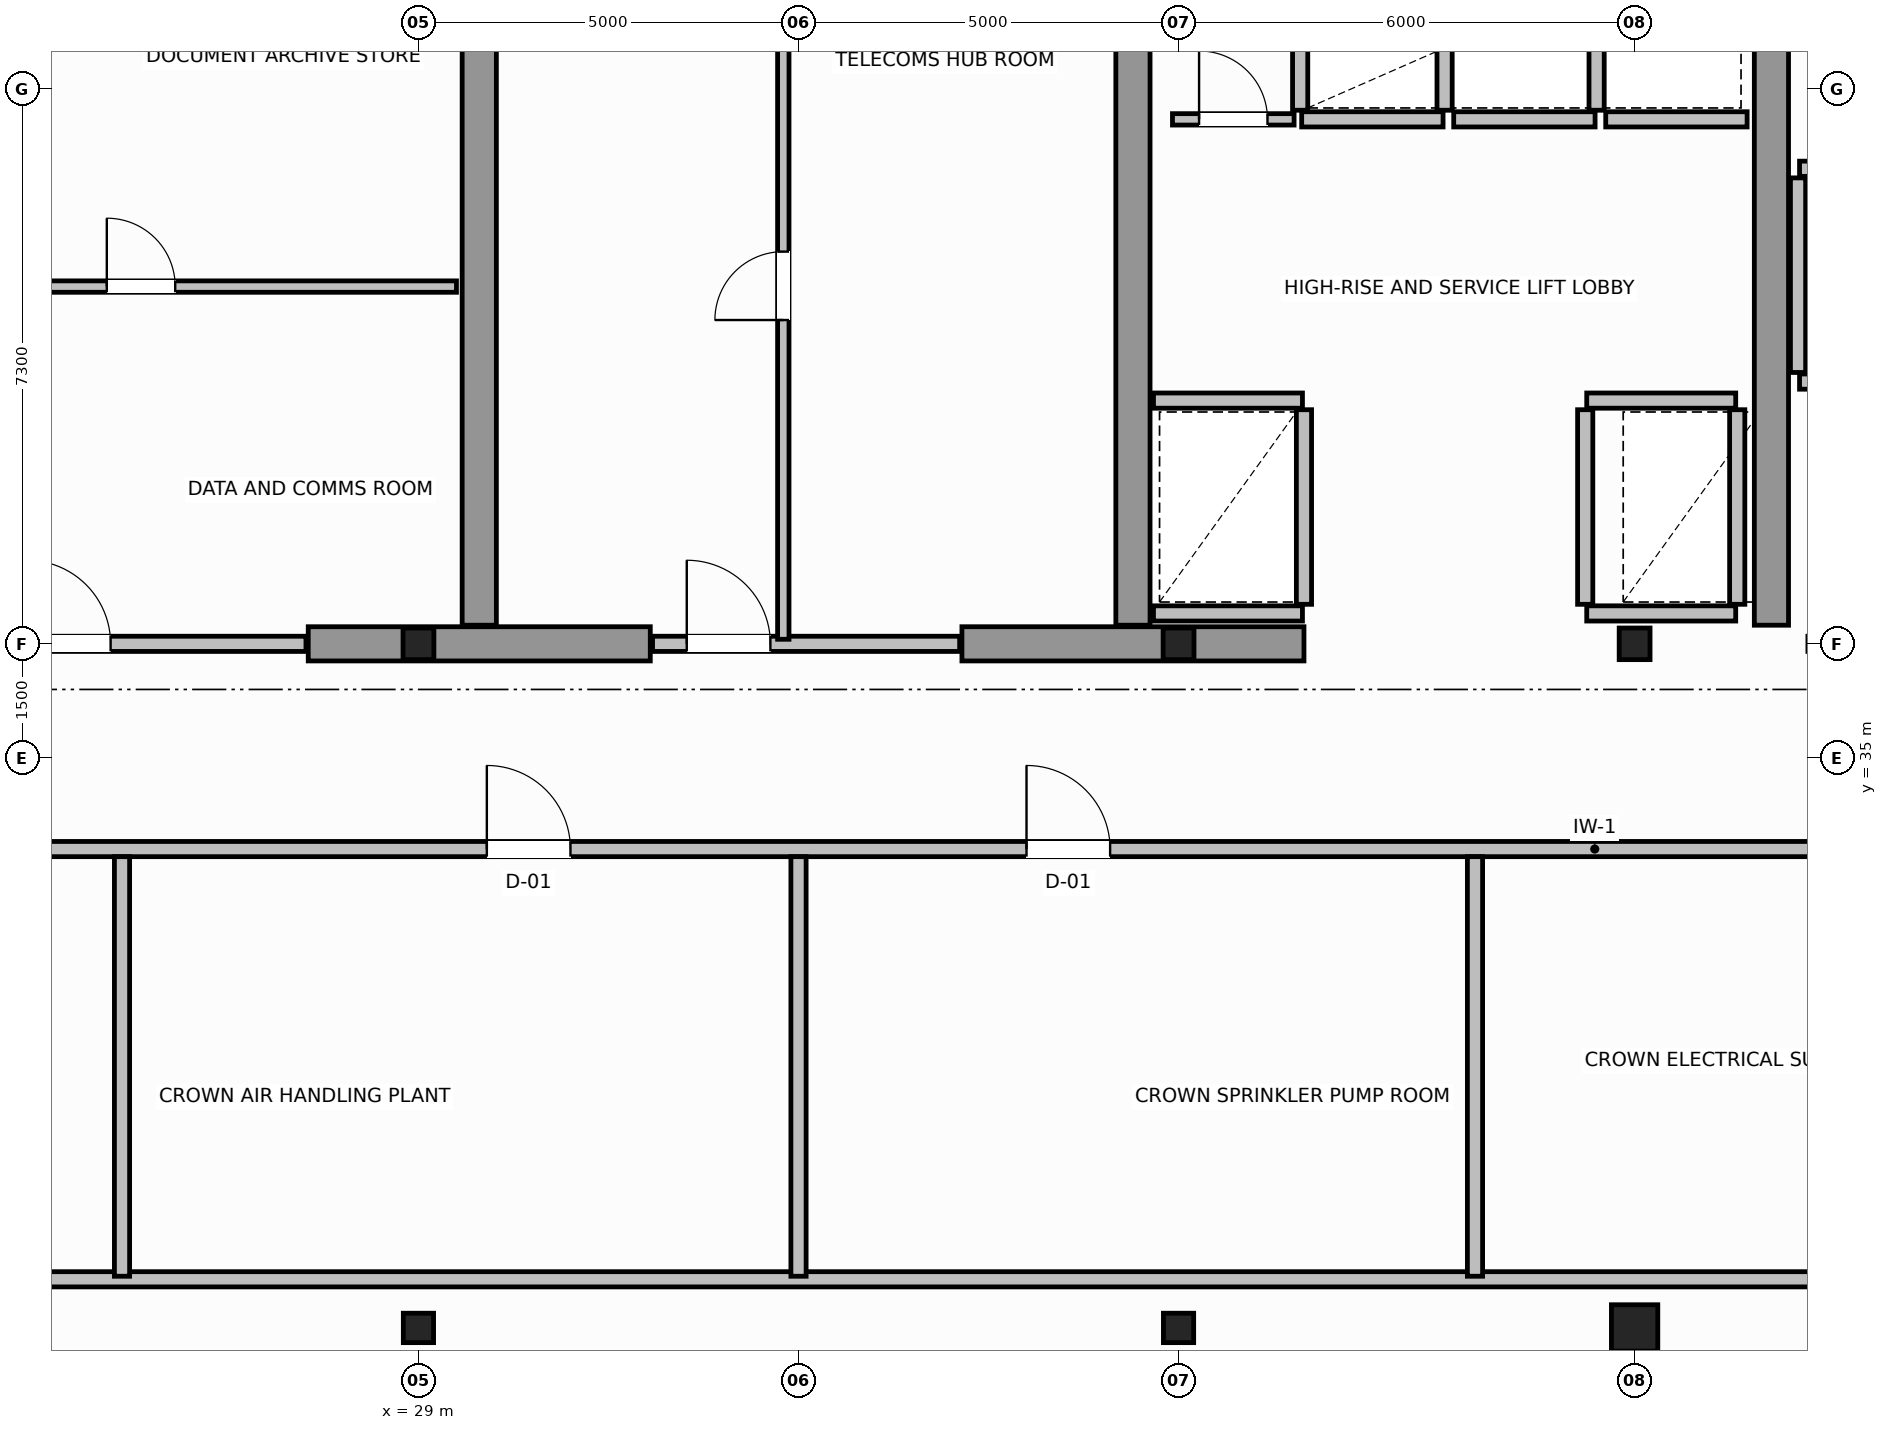
"""IFC4 building model, lengths in metres.
Left out: names, types, materials, properties, quantities, classifications, styles, units other than length and angle.
Written with IfcOpenShell. Run it as: python <this file> out.ifc"""

import sys

from ifc_helpers import new_model, si_unit, direction, frame, frame_2d, origin, origin_2d, place, context, subcontext, project, spatial, rectangle, hollow_circle, i_section, extrude, source, transform, mapped, element, fill, save


model = new_model("IFC4")
c1 = context("Model", 3, precision=1e-05, world=origin(), true_north=direction((0.0, 1.0)))
c2 = subcontext(c1, "Body", "Model", "MODEL_VIEW")
j1 = project(units=[si_unit("LENGTHUNIT", "METRE"), si_unit("PLANEANGLEUNIT", "RADIAN")], contexts=[c1])
p1 = place(None, origin())
s1 = spatial("IfcSite", under=j1, at=p1, CompositionType="ELEMENT")
p2 = place(p1, origin())
s2 = spatial("IfcBuilding", under=s1, at=p2, CompositionType="ELEMENT")
p3 = place(p2, frame((0.0, 0.0, 303.8)))
s3 = spatial("IfcBuildingStorey", under=s2, at=p3, CompositionType="ELEMENT", Elevation=303.8)
m1 = source(origin(), c2, "Body", "SweptSolid", [
    extrude(i_section(OverallWidth=0.406, OverallDepth=0.416, WebThickness=0.03, FlangeThickness=0.042, FilletRadius=0.015, at=origin_2d()), origin(), (0.0, 0.0, 1.0), 4.6),
])
for number, where, z_axis, x_axis in (
    (1, (29.0, 36.5, 0.0), (0.0, 0.0, 1.0), (1.0, 0.0, 0.0)),
    (2, (39.0, 36.5, 0.0), (0.0, 0.0, 1.0), (1.0, 0.0, 0.0)),
    (3, (45.0, 36.5, 0.0), (0.0, 0.0, 1.0), (1.0, 0.0, 0.0)),
):
    element("IfcColumn", number, at=place(p3, frame(where, z_axis=z_axis, x_axis=x_axis)), inside=s3, PredefinedType="COLUMN", context=c2, shape_type="MappedRepresentation", body=[
        mapped(m1, transform((0.0, 0.0, 0.0), scale=1.0)),
    ])
m2 = source(origin(), c2, "Body", "SweptSolid", [
    extrude(i_section(OverallWidth=0.398, OverallDepth=0.387, WebThickness=0.021, FlangeThickness=0.029, FilletRadius=0.015, at=origin_2d()), origin(), (0.0, 0.0, 1.0), 4.6),
])
for number, where, z_axis, x_axis in (
    (4, (29.0, 27.5, 0.0), (0.0, 0.0, 1.0), (1.0, 0.0, 0.0)),
    (5, (39.0, 27.5, 0.0), (0.0, 0.0, 1.0), (1.0, 0.0, 0.0)),
):
    element("IfcColumn", number, at=place(p3, frame(where, z_axis=z_axis, x_axis=x_axis)), inside=s3, PredefinedType="COLUMN", context=c2, shape_type="MappedRepresentation", body=[
        mapped(m2, transform((0.0, 0.0, 0.0), scale=1.0)),
    ])
m3 = source(origin(), c2, "Body", "SweptSolid", [
    extrude(hollow_circle(Radius=0.305, WallThickness=0.03, at=origin_2d()), origin(), (0.0, 0.0, 1.0), 4.6),
])
p4 = place(p3, frame((45.0, 27.5, 0.0), z_axis=(0.0, 0.0, 1.0), x_axis=(1.0, 0.0, 0.0)))
e6 = element("IfcColumn", 6, at=p4, inside=s3, PredefinedType="COLUMN", context=c2, shape_type="MappedRepresentation", body=[
    mapped(m3, transform((0.0, 0.0, 0.0), scale=1.0)),
])
for number, where, z_axis, x_axis in (
    (7, (27.55, 36.5, 0.0), (0.0, 0.0, 1.0), (1.0, 0.0, 0.0)),
    (8, (36.15, 36.5, 0.0), (0.0, 0.0, 1.0), (1.0, 0.0, 0.0)),
):
    element("IfcWall", number, at=place(p3, frame(where, z_axis=z_axis, x_axis=x_axis)), inside=s3, PredefinedType="SHEAR", context=c2, shape_type="SweptSolid", body=[
        extrude(rectangle(XDim=4.5, YDim=0.45, at=frame_2d((2.25, 0.0))), origin(), (0.0, 0.0, 1.0), 4.6),
    ])
for number, where, z_axis, x_axis in (
    (9, (29.8, 36.745, 0.0), (0.0, 0.0, 1.0), (0.0, 1.0, 0.0)),
    (10, (38.4, 36.745, 0.0), (0.0, 0.0, 1.0), (0.0, 1.0, 0.0)),
    (11, (46.8, 36.745, 0.0), (0.0, 0.0, 1.0), (0.0, 1.0, 0.0)),
):
    element("IfcWall", number, at=place(p3, frame(where, z_axis=z_axis, x_axis=x_axis)), inside=s3, PredefinedType="SHEAR", context=c2, shape_type="SweptSolid", body=[
        extrude(rectangle(XDim=9.455, YDim=0.45, at=frame_2d((4.728, 0.0))), origin(), (0.0, 0.0, 1.0), 4.6),
    ])
p5 = place(p3, frame((38.67, 39.7, 0.0), z_axis=(0.0, 0.0, 1.0), x_axis=(1.0, 0.0, 0.0)))
e12 = element("IfcWall", 12, at=p5, inside=s3, PredefinedType="SOLIDWALL", context=c2, shape_type="SweptSolid", body=[
    extrude(rectangle(XDim=1.96, YDim=0.2, at=frame_2d((0.98, 0.0))), origin(), (0.0, 0.0, 1.0), 4.3),
])
p6 = place(p3, frame((38.67, 36.9, 0.0), z_axis=(0.0, 0.0, 1.0), x_axis=(1.0, 0.0, 0.0)))
e13 = element("IfcWall", 13, at=p6, inside=s3, PredefinedType="SOLIDWALL", context=c2, shape_type="SweptSolid", body=[
    extrude(rectangle(XDim=1.96, YDim=0.2, at=frame_2d((0.98, 0.0))), origin(), (0.0, 0.0, 1.0), 3.09),
])
p7 = place(p3, frame((40.65, 37.02, 0.0), z_axis=(0.0, 0.0, 1.0), x_axis=(0.0, 1.0, 0.0)))
e14 = element("IfcWall", 14, at=p7, inside=s3, PredefinedType="SOLIDWALL", context=c2, shape_type="SweptSolid", body=[
    extrude(rectangle(XDim=2.56, YDim=0.2, at=frame_2d((1.28, 0.0))), origin(), (0.0, 0.0, 1.0), 4.3),
])
p8 = place(p3, frame((44.37, 39.7, 0.0), z_axis=(0.0, 0.0, 1.0), x_axis=(1.0, 0.0, 0.0)))
e15 = element("IfcWall", 15, at=p8, inside=s3, PredefinedType="SOLIDWALL", context=c2, shape_type="SweptSolid", body=[
    extrude(rectangle(XDim=1.96, YDim=0.2, at=frame_2d((0.98, 0.0))), origin(), (0.0, 0.0, 1.0), 4.3),
])
p9 = place(p3, frame((44.37, 36.9, 0.0), z_axis=(0.0, 0.0, 1.0), x_axis=(1.0, 0.0, 0.0)))
e16 = element("IfcWall", 16, at=p9, inside=s3, PredefinedType="SOLIDWALL", context=c2, shape_type="SweptSolid", body=[
    extrude(rectangle(XDim=1.96, YDim=0.2, at=frame_2d((0.98, 0.0))), origin(), (0.0, 0.0, 1.0), 3.09),
])
for number, where, z_axis, x_axis in (
    (17, (44.35, 37.02, 0.0), (0.0, 0.0, 1.0), (0.0, 1.0, 0.0)),
    (18, (46.35, 37.02, 0.0), (0.0, 0.0, 1.0), (0.0, 1.0, 0.0)),
):
    element("IfcWall", number, at=place(p3, frame(where, z_axis=z_axis, x_axis=x_axis)), inside=s3, PredefinedType="SOLIDWALL", context=c2, shape_type="SweptSolid", body=[
        extrude(rectangle(XDim=2.56, YDim=0.2, at=frame_2d((1.28, 0.0))), origin(), (0.0, 0.0, 1.0), 4.3),
    ])
p10 = place(p3, frame((40.62, 43.4, 0.0), z_axis=(0.0, 0.0, 1.0), x_axis=(1.0, 0.0, 0.0)))
e19 = element("IfcWall", 19, at=p10, inside=s3, PredefinedType="SOLIDWALL", context=c2, shape_type="SweptSolid", body=[
    extrude(rectangle(XDim=1.86, YDim=0.2, at=frame_2d((0.93, 0.0))), origin(), (0.0, 0.0, 1.0), 4.3),
])
for number, where, z_axis, x_axis in (
    (20, (40.6, 43.52, 0.0), (0.0, 0.0, 1.0), (0.0, 1.0, 0.0)),
    (21, (42.5, 43.52, 0.0), (0.0, 0.0, 1.0), (0.0, 1.0, 0.0)),
):
    element("IfcWall", number, at=place(p3, frame(where, z_axis=z_axis, x_axis=x_axis)), inside=s3, PredefinedType="SOLIDWALL", context=c2, shape_type="SweptSolid", body=[
        extrude(rectangle(XDim=2.56, YDim=0.2, at=frame_2d((1.28, 0.0))), origin(), (0.0, 0.0, 1.0), 4.3),
    ])
p11 = place(p3, frame((42.62, 43.4, 0.0), z_axis=(0.0, 0.0, 1.0), x_axis=(1.0, 0.0, 0.0)))
e22 = element("IfcWall", 22, at=p11, inside=s3, PredefinedType="SOLIDWALL", context=c2, shape_type="SweptSolid", body=[
    extrude(rectangle(XDim=1.86, YDim=0.2, at=frame_2d((0.93, 0.0))), origin(), (0.0, 0.0, 1.0), 4.3),
])
p12 = place(p3, frame((44.5, 43.52, 0.0), z_axis=(0.0, 0.0, 1.0), x_axis=(0.0, 1.0, 0.0)))
e23 = element("IfcWall", 23, at=p12, inside=s3, PredefinedType="SOLIDWALL", context=c2, shape_type="SweptSolid", body=[
    extrude(rectangle(XDim=2.56, YDim=0.2, at=frame_2d((1.28, 0.0))), origin(), (0.0, 0.0, 1.0), 3.09),
])
p13 = place(p3, frame((44.62, 43.4, 0.0), z_axis=(0.0, 0.0, 1.0), x_axis=(1.0, 0.0, 0.0)))
e24 = element("IfcWall", 24, at=p13, inside=s3, PredefinedType="SOLIDWALL", context=c2, shape_type="SweptSolid", body=[
    extrude(rectangle(XDim=1.86, YDim=0.2, at=frame_2d((0.93, 0.0))), origin(), (0.0, 0.0, 1.0), 4.3),
])
p14 = place(p3, frame((47.17, 39.95, 0.0), z_axis=(0.0, 0.0, 1.0), x_axis=(1.0, 0.0, 0.0)))
e25 = element("IfcWall", 25, at=p14, inside=s3, PredefinedType="SOLIDWALL", context=c2, shape_type="SweptSolid", body=[
    extrude(rectangle(XDim=2.16, YDim=0.2, at=frame_2d((1.08, 0.0))), origin(), (0.0, 0.0, 1.0), 4.3),
])
p15 = place(p14, frame((0.53, 0.0, 0.0)))
e26 = element("IfcOpeningElement", 26, at=p15, cuts=e25, PredefinedType="OPENING", context=c2, shape_type="SweptSolid", body=[
    extrude(rectangle(XDim=1.1, YDim=2.15, at=frame_2d((0.55, 1.075))), frame((0.0, 0.11, 0.0), z_axis=(0.0, -1.0, 0.0), x_axis=(1.0, 0.0, 0.0)), (0.0, 0.0, 1.0), 0.22),
])
p16 = place(p3, frame((47.17, 42.75, 0.0), z_axis=(0.0, 0.0, 1.0), x_axis=(1.0, 0.0, 0.0)))
e27 = element("IfcWall", 27, at=p16, inside=s3, PredefinedType="SOLIDWALL", context=c2, shape_type="SweptSolid", body=[
    extrude(rectangle(XDim=2.16, YDim=0.2, at=frame_2d((1.08, 0.0))), origin(), (0.0, 0.0, 1.0), 4.3),
])
p17 = place(p3, frame((47.15, 40.07, 0.0), z_axis=(0.0, 0.0, 1.0), x_axis=(0.0, 1.0, 0.0)))
e28 = element("IfcWall", 28, at=p17, inside=s3, PredefinedType="SOLIDWALL", context=c2, shape_type="SweptSolid", body=[
    extrude(rectangle(XDim=2.56, YDim=0.2, at=frame_2d((1.28, 0.0))), origin(), (0.0, 0.0, 1.0), 4.3),
])
p18 = place(p3, frame((21.25, 36.5, 0.0), z_axis=(0.0, 0.0, 1.0), x_axis=(1.0, 0.0, 0.0)))
e29 = element("IfcWall", 29, at=p18, inside=s3, PredefinedType="SOLIDWALL", context=c2, shape_type="SweptSolid", body=[
    extrude(rectangle(XDim=6.27, YDim=0.2, at=frame_2d((3.135, 0.0))), origin(), (0.0, 0.0, 1.0), 3.09),
])
p19 = place(p18, frame((2.6, 0.0, 0.0)))
e30 = element("IfcOpeningElement", 30, at=p19, cuts=e29, PredefinedType="OPENING", context=c2, shape_type="SweptSolid", body=[
    extrude(rectangle(XDim=1.1, YDim=2.15, at=frame_2d((0.55, 1.075))), frame((0.0, 0.11, 0.0), z_axis=(0.0, -1.0, 0.0), x_axis=(1.0, 0.0, 0.0)), (0.0, 0.0, 1.0), 0.22),
])
p20 = place(p3, frame((21.5, 41.2, 0.0), z_axis=(0.0, 0.0, 1.0), x_axis=(1.0, 0.0, 0.0)))
e31 = element("IfcWall", 31, at=p20, inside=s3, PredefinedType="PARTITIONING", context=c2, shape_type="SweptSolid", body=[
    extrude(rectangle(XDim=8.0, YDim=0.15, at=frame_2d((4.0, 0.0))), origin(), (0.0, 0.0, 1.0), 4.3),
])
p21 = place(p20, frame((3.4, 0.0, 0.0)))
e32 = element("IfcOpeningElement", 32, at=p21, cuts=e31, PredefinedType="OPENING", context=c2, shape_type="SweptSolid", body=[
    extrude(rectangle(XDim=0.9, YDim=2.1, at=frame_2d((0.45, 1.05))), frame((0.0, 0.085, 0.0), z_axis=(0.0, -1.0, 0.0), x_axis=(1.0, 0.0, 0.0)), (0.0, 0.0, 1.0), 0.17),
])
p22 = place(p3, frame((32.08, 36.5, 0.0), z_axis=(0.0, 0.0, 1.0), x_axis=(1.0, 0.0, 0.0)))
e33 = element("IfcWall", 33, at=p22, inside=s3, PredefinedType="SOLIDWALL", context=c2, shape_type="SweptSolid", body=[
    extrude(rectangle(XDim=4.04, YDim=0.2, at=frame_2d((2.02, 0.0))), origin(), (0.0, 0.0, 1.0), 3.09),
])
p23 = place(p22, frame((0.45, 0.0, 0.0)))
e34 = element("IfcOpeningElement", 34, at=p23, cuts=e33, PredefinedType="OPENING", context=c2, shape_type="SweptSolid", body=[
    extrude(rectangle(XDim=1.1, YDim=2.15, at=frame_2d((0.55, 1.075))), frame((0.0, 0.11, 0.0), z_axis=(0.0, -1.0, 0.0), x_axis=(1.0, 0.0, 0.0)), (0.0, 0.0, 1.0), 0.22),
])
p24 = place(p3, frame((33.8, 36.56, 0.0), z_axis=(0.0, 0.0, 1.0), x_axis=(0.0, 1.0, 0.0)))
e35 = element("IfcWall", 35, at=p24, inside=s3, PredefinedType="PARTITIONING", context=c2, shape_type="SweptSolid", body=[
    extrude(rectangle(XDim=9.58, YDim=0.15, at=frame_2d((4.79, 0.0))), origin(), (0.0, 0.0, 1.0), 4.3),
])
p25 = place(p24, frame((4.2, 0.0, 0.0)))
e36 = element("IfcOpeningElement", 36, at=p25, cuts=e35, PredefinedType="OPENING", context=c2, shape_type="SweptSolid", body=[
    extrude(rectangle(XDim=0.9, YDim=2.1, at=frame_2d((0.45, 1.05))), frame((0.0, 0.085, 0.0), z_axis=(0.0, -1.0, 0.0), x_axis=(1.0, 0.0, 0.0)), (0.0, 0.0, 1.0), 0.17),
])
p26 = place(p3, frame((38.92, 43.4, 0.0), z_axis=(0.0, 0.0, 1.0), x_axis=(1.0, 0.0, 0.0)))
e37 = element("IfcWall", 37, at=p26, inside=s3, PredefinedType="PARTITIONING", context=c2, shape_type="SweptSolid", body=[
    extrude(rectangle(XDim=1.6, YDim=0.15, at=frame_2d((0.8, 0.0))), origin(), (0.0, 0.0, 1.0), 4.3),
])
p27 = place(p26, frame((0.35, 0.0, 0.0)))
e38 = element("IfcOpeningElement", 38, at=p27, cuts=e37, PredefinedType="OPENING", context=c2, shape_type="SweptSolid", body=[
    extrude(rectangle(XDim=0.9, YDim=2.1, at=frame_2d((0.45, 1.05))), frame((0.0, 0.085, 0.0), z_axis=(0.0, -1.0, 0.0), x_axis=(1.0, 0.0, 0.0)), (0.0, 0.0, 1.0), 0.17),
])
p28 = place(p3, frame((7.897, 33.8, 0.0), z_axis=(0.0, 0.0, 1.0), x_axis=(1.0, 0.0, 0.0)))
e39 = element("IfcWall", 39, at=p28, inside=s3, PredefinedType="SOLIDWALL", context=c2, shape_type="SweptSolid", body=[
    extrude(rectangle(XDim=52.207, YDim=0.2, at=frame_2d((26.103, 0.0))), origin(), (0.0, 0.0, 1.0), 4.3),
])
p29 = place(p28, frame((8.152, 0.0, 0.0)))
e40 = element("IfcOpeningElement", 40, at=p29, cuts=e39, PredefinedType="OPENING", context=c2, shape_type="SweptSolid", body=[
    extrude(rectangle(XDim=1.1, YDim=2.15, at=frame_2d((0.55, 1.075))), frame((0.0, 0.11, 0.0), z_axis=(0.0, -1.0, 0.0), x_axis=(1.0, 0.0, 0.0)), (0.0, 0.0, 1.0), 0.22),
])
p30 = place(p28, frame((22.003, 0.0, 0.0)))
e41 = element("IfcOpeningElement", 41, at=p30, cuts=e39, PredefinedType="OPENING", context=c2, shape_type="SweptSolid", body=[
    extrude(rectangle(XDim=1.1, YDim=2.15, at=frame_2d((0.55, 1.075))), frame((0.0, 0.11, 0.0), z_axis=(0.0, -1.0, 0.0), x_axis=(1.0, 0.0, 0.0)), (0.0, 0.0, 1.0), 0.22),
])
p31 = place(p28, frame((29.103, 0.0, 0.0)))
e42 = element("IfcOpeningElement", 42, at=p31, cuts=e39, PredefinedType="OPENING", context=c2, shape_type="SweptSolid", body=[
    extrude(rectangle(XDim=1.1, YDim=2.15, at=frame_2d((0.55, 1.075))), frame((0.0, 0.11, 0.0), z_axis=(0.0, -1.0, 0.0), x_axis=(1.0, 0.0, 0.0)), (0.0, 0.0, 1.0), 0.22),
])
p32 = place(p28, frame((42.955, 0.0, 0.0)))
e43 = element("IfcOpeningElement", 43, at=p32, cuts=e39, PredefinedType="OPENING", context=c2, shape_type="SweptSolid", body=[
    extrude(rectangle(XDim=1.1, YDim=2.15, at=frame_2d((0.55, 1.075))), frame((0.0, 0.11, 0.0), z_axis=(0.0, -1.0, 0.0), x_axis=(1.0, 0.0, 0.0)), (0.0, 0.0, 1.0), 0.22),
])
p33 = place(p3, frame((8.982, 28.14, 0.0), z_axis=(0.0, 0.0, 1.0), x_axis=(1.0, 0.0, 0.0)))
e44 = element("IfcWall", 44, at=p33, inside=s3, PredefinedType="SOLIDWALL", context=c2, shape_type="SweptSolid", body=[
    extrude(rectangle(XDim=50.036, YDim=0.2, at=frame_2d((25.018, 0.0))), origin(), (0.0, 0.0, 1.0), 4.3),
])
for number, where, z_axis, x_axis in (
    (45, (25.1, 28.18, 0.0), (0.0, 0.0, 1.0), (0.0, 1.0, 0.0)),
    (46, (34.0, 28.18, 0.0), (0.0, 0.0, 1.0), (0.0, 1.0, 0.0)),
    (47, (42.9, 28.18, 0.0), (0.0, 0.0, 1.0), (0.0, 1.0, 0.0)),
):
    element("IfcWall", number, at=place(p3, frame(where, z_axis=z_axis, x_axis=x_axis)), inside=s3, PredefinedType="SOLIDWALL", context=c2, shape_type="SweptSolid", body=[
        extrude(rectangle(XDim=5.52, YDim=0.2, at=frame_2d((2.76, 0.0))), origin(), (0.0, 0.0, 1.0), 4.3),
    ])
m4 = source(origin(), c2, "Body", "SweptSolid", [
    extrude(rectangle(XDim=1.1, YDim=2.15, at=frame_2d((0.55, 1.075))), frame((0.0, 0.025, 0.0), z_axis=(0.0, -1.0, 0.0), x_axis=(1.0, 0.0, 0.0)), (0.0, 0.0, 1.0), 0.05),
])
p34 = place(p19, origin())
e48 = element("IfcDoor", 48, at=p34, inside=s3, OperationType="SINGLE_SWING_LEFT", PredefinedType="DOOR", context=c2, shape_type="MappedRepresentation", body=[
    mapped(m4, transform((0.0, 0.0, 0.0), scale=1.0)),
])
fill(e30, e48)
m5 = source(origin(), c2, "Body", "SweptSolid", [
    extrude(rectangle(XDim=0.9, YDim=2.1, at=frame_2d((0.45, 1.05))), frame((0.0, 0.025, 0.0), z_axis=(0.0, -1.0, 0.0), x_axis=(1.0, 0.0, 0.0)), (0.0, 0.0, 1.0), 0.05),
])
p35 = place(p21, origin())
e49 = element("IfcDoor", 49, at=p35, inside=s3, OperationType="SINGLE_SWING_RIGHT", PredefinedType="DOOR", context=c2, shape_type="MappedRepresentation", body=[
    mapped(m5, transform((0.0, 0.0, 0.0), scale=1.0)),
])
fill(e32, e49)
p36 = place(p23, origin())
e50 = element("IfcDoor", 50, at=p36, inside=s3, OperationType="SINGLE_SWING_LEFT", PredefinedType="DOOR", context=c2, shape_type="MappedRepresentation", body=[
    mapped(m4, transform((0.0, 0.0, 0.0), scale=1.0)),
])
fill(e34, e50)
p37 = place(p25, origin())
e51 = element("IfcDoor", 51, at=p37, inside=s3, OperationType="SINGLE_SWING_RIGHT", PredefinedType="DOOR", context=c2, shape_type="MappedRepresentation", body=[
    mapped(m5, transform((0.0, 0.0, 0.0), scale=1.0)),
])
fill(e36, e51)
p38 = place(p27, origin())
e52 = element("IfcDoor", 52, at=p38, inside=s3, OperationType="SINGLE_SWING_LEFT", PredefinedType="DOOR", context=c2, shape_type="MappedRepresentation", body=[
    mapped(m5, transform((0.0, 0.0, 0.0), scale=1.0)),
])
fill(e38, e52)
p39 = place(p30, origin())
e53 = element("IfcDoor", 53, at=p39, inside=s3, OperationType="SINGLE_SWING_RIGHT", PredefinedType="DOOR", context=c2, shape_type="MappedRepresentation", body=[
    mapped(m4, transform((0.0, 0.0, 0.0), scale=1.0)),
])
fill(e41, e53)
p40 = place(p31, origin())
e54 = element("IfcDoor", 54, at=p40, inside=s3, OperationType="SINGLE_SWING_LEFT", PredefinedType="DOOR", context=c2, shape_type="MappedRepresentation", body=[
    mapped(m4, transform((0.0, 0.0, 0.0), scale=1.0)),
])
fill(e42, e54)
save(model, sys.argv[1])
